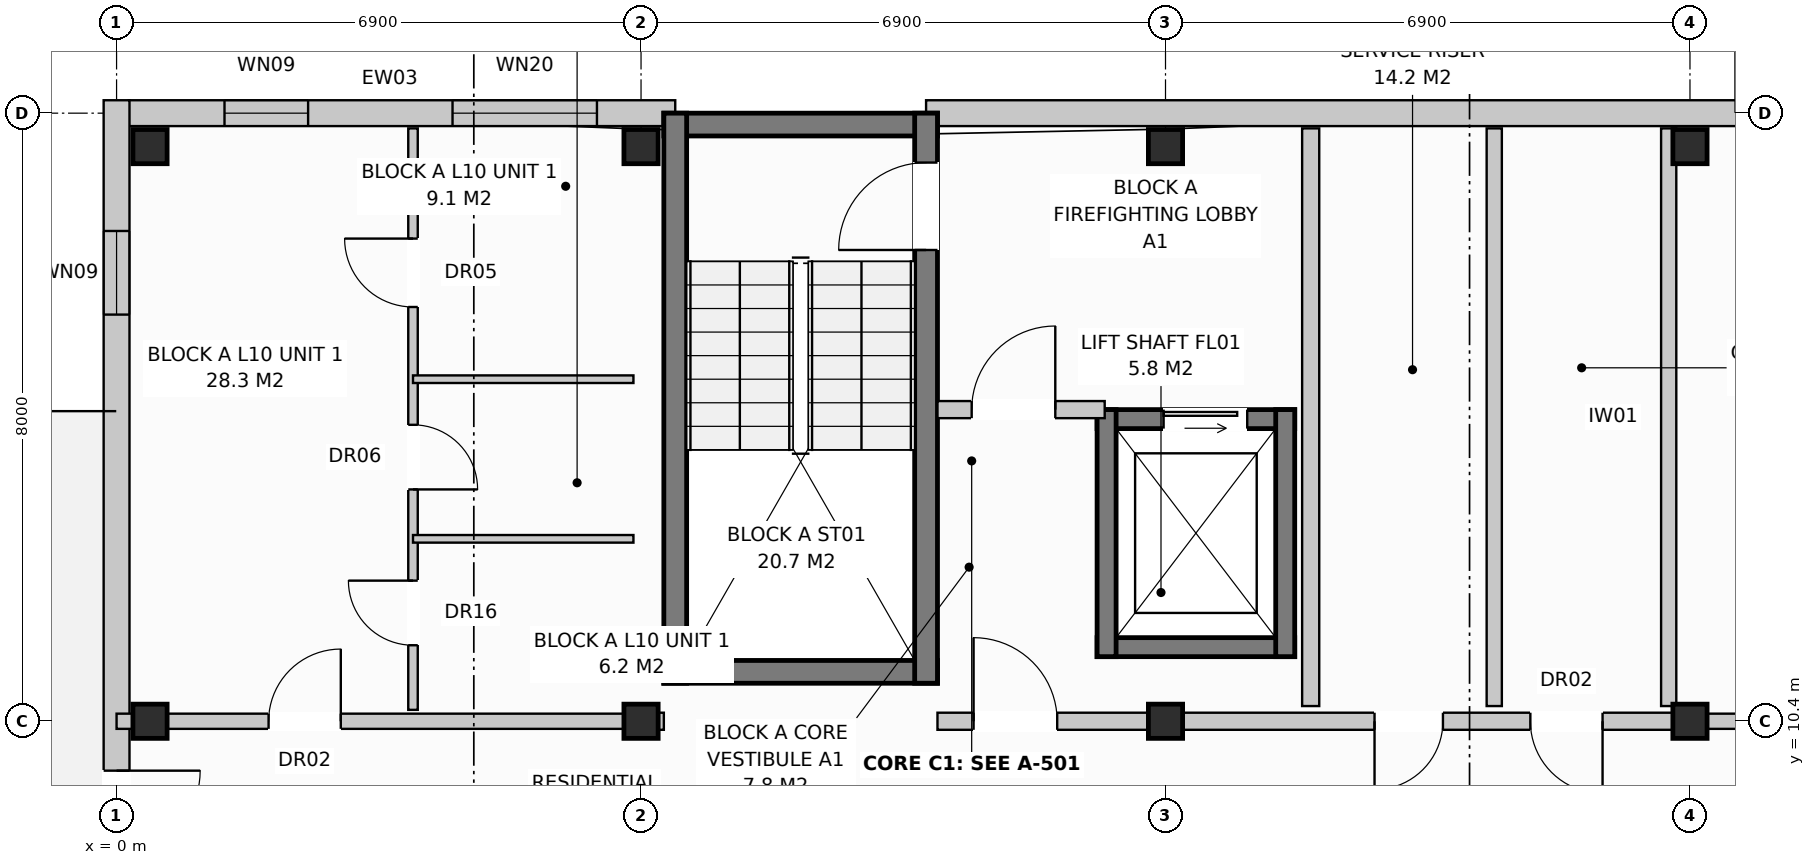
"""IFC4 building model, lengths in metres.
Left out: names, types, materials, properties, quantities, classifications, styles, units other than length and angle.
Written with IfcOpenShell. Run it as: python <this file> out.ifc"""

import sys

from ifc_helpers import new_model, si_unit, direction, frame, frame_2d, origin, origin_with_axes, origin_2d, place, context, subcontext, project, spatial, rectangle, extrude, element, fill, save


model = new_model("IFC4")
c1 = context("Model", 3, precision=1e-05, world=origin(), true_north=direction((0.0, 1.0)))
c2 = subcontext(c1, "Body", "Model", "MODEL_VIEW")
j1 = project(units=[si_unit("LENGTHUNIT", "METRE"), si_unit("PLANEANGLEUNIT", "RADIAN")], contexts=[c1])
p1 = place(None, origin())
s1 = spatial("IfcSite", under=j1, at=p1, CompositionType="ELEMENT")
p2 = place(p1, origin())
s2 = spatial("IfcBuilding", under=s1, at=p2, CompositionType="ELEMENT")
p3 = place(p2, frame((0.0, 0.0, 33.6)))
s3 = spatial("IfcBuildingStorey", under=s2, at=p3, CompositionType="ELEMENT", Elevation=33.6)
for number, where, z_axis, x_axis in (
    (1, (0.44, 10.4, 0.0), (0.0, 0.0, 1.0), (1.0, 0.0, 0.0)),
    (2, (0.44, 17.96, 0.0), (0.0, 0.0, 1.0), (1.0, 0.0, 0.0)),
    (3, (6.9, 10.4, 0.0), (0.0, 0.0, 1.0), (1.0, 0.0, 0.0)),
    (4, (6.9, 17.96, 0.0), (0.0, 0.0, 1.0), (1.0, 0.0, 0.0)),
    (5, (13.8, 10.4, 0.0), (0.0, 0.0, 1.0), (1.0, 0.0, 0.0)),
    (6, (13.8, 17.96, 0.0), (0.0, 0.0, 1.0), (1.0, 0.0, 0.0)),
    (7, (20.7, 10.4, 0.0), (0.0, 0.0, 1.0), (1.0, 0.0, 0.0)),
    (8, (20.7, 17.96, 0.0), (0.0, 0.0, 1.0), (1.0, 0.0, 0.0)),
):
    element("IfcColumn", number, at=place(p3, frame(where, z_axis=z_axis, x_axis=x_axis)), inside=s3, PredefinedType="COLUMN", context=c2, shape_type="SweptSolid", body=[
        extrude(rectangle(XDim=0.45, YDim=0.45, at=origin_2d()), origin(), (0.0, 0.0, 1.0), 3.2),
    ])
p4 = place(p3, frame((0.16, 18.4, 0.0), z_axis=(0.0, 0.0, 1.0), x_axis=(1.0, 0.0, 0.0)))
e9 = element("IfcWall", 9, at=p4, inside=s3, PredefinedType="STANDARD", context=c2, shape_type="SweptSolid", body=[
    extrude(rectangle(XDim=7.19, YDim=0.34, at=frame_2d((3.595, 0.0))), origin(), (0.0, 0.0, 1.0), 2.96),
])
p5 = place(p4, frame((1.26, 0.0, 0.72)))
e10 = element("IfcOpeningElement", 10, at=p5, cuts=e9, PredefinedType="OPENING", context=c2, shape_type="SweptSolid", body=[
    extrude(rectangle(XDim=1.1, YDim=1.5, at=frame_2d((0.55, 0.75))), frame((0.0, 0.182, 0.0), z_axis=(0.0, -1.0, 0.0), x_axis=(1.0, 0.0, 0.0)), (0.0, 0.0, 1.0), 0.364),
])
p6 = place(p4, frame((4.26, 0.0, 0.8)))
e11 = element("IfcOpeningElement", 11, at=p6, cuts=e9, PredefinedType="OPENING", context=c2, shape_type="SweptSolid", body=[
    extrude(rectangle(XDim=1.9, YDim=1.85, at=frame_2d((0.95, 0.925))), frame((0.0, 0.182, 0.0), z_axis=(0.0, -1.0, 0.0), x_axis=(1.0, 0.0, 0.0)), (0.0, 0.0, 1.0), 0.364),
])
p7 = place(p3, frame((10.65, 18.4, 0.0), z_axis=(0.0, 0.0, 1.0), x_axis=(1.0, 0.0, 0.0)))
e12 = element("IfcWall", 12, at=p7, inside=s3, PredefinedType="STANDARD", context=c2, shape_type="SweptSolid", body=[
    extrude(rectangle(XDim=17.4, YDim=0.34, at=frame_2d((8.7, 0.0))), origin(), (0.0, 0.0, 1.0), 2.96),
])
p8 = place(p7, frame((11.82, 0.0, 0.0)))
e13 = element("IfcOpeningElement", 13, at=p8, cuts=e12, PredefinedType="OPENING", context=c2, shape_type="SweptSolid", body=[
    extrude(rectangle(XDim=1.05, YDim=2.12, at=frame_2d((0.525, 1.06))), frame((0.0, 0.182, 0.0), z_axis=(0.0, -1.0, 0.0), x_axis=(1.0, 0.0, 0.0)), (0.0, 0.0, 1.0), 0.364),
])
p9 = place(p7, frame((14.87, 0.0, 0.72)))
e14 = element("IfcOpeningElement", 14, at=p9, cuts=e12, PredefinedType="OPENING", context=c2, shape_type="SweptSolid", body=[
    extrude(rectangle(XDim=1.1, YDim=1.5, at=frame_2d((0.55, 0.75))), frame((0.0, 0.182, 0.0), z_axis=(0.0, -1.0, 0.0), x_axis=(1.0, 0.0, 0.0)), (0.0, 0.0, 1.0), 0.364),
])
p10 = place(p3, frame((0.0, -0.17, 0.0), z_axis=(0.0, 0.0, 1.0), x_axis=(0.0, 1.0, 0.0)))
e15 = element("IfcWall", 15, at=p10, inside=s3, PredefinedType="STANDARD", context=c2, shape_type="SweptSolid", body=[
    extrude(rectangle(XDim=18.74, YDim=0.34, at=frame_2d((9.37, 0.0))), origin(), (0.0, 0.0, 1.0), 2.96),
])
p11 = place(p10, frame((8.82, 0.0, 0.0)))
e16 = element("IfcOpeningElement", 16, at=p11, cuts=e15, PredefinedType="OPENING", context=c2, shape_type="SweptSolid", body=[
    extrude(rectangle(XDim=1.1, YDim=2.1, at=frame_2d((0.55, 1.05))), frame((0.0, 0.182, 0.0), z_axis=(0.0, -1.0, 0.0), x_axis=(1.0, 0.0, 0.0)), (0.0, 0.0, 1.0), 0.364),
])
p12 = place(p10, frame((1.72, 0.0, 0.72)))
e17 = element("IfcOpeningElement", 17, at=p12, cuts=e15, PredefinedType="OPENING", context=c2, shape_type="SweptSolid", body=[
    extrude(rectangle(XDim=1.1, YDim=1.5, at=frame_2d((0.55, 0.75))), frame((0.0, 0.182, 0.0), z_axis=(0.0, -1.0, 0.0), x_axis=(1.0, 0.0, 0.0)), (0.0, 0.0, 1.0), 0.364),
])
p13 = place(p10, frame((15.92, 0.0, 0.72)))
e18 = element("IfcOpeningElement", 18, at=p13, cuts=e15, PredefinedType="OPENING", context=c2, shape_type="SweptSolid", body=[
    extrude(rectangle(XDim=1.1, YDim=1.5, at=frame_2d((0.55, 0.75))), frame((0.0, 0.182, 0.0), z_axis=(0.0, -1.0, 0.0), x_axis=(1.0, 0.0, 0.0)), (0.0, 0.0, 1.0), 0.364),
])
for number, where, z_axis, x_axis in (
    (19, (7.2, 18.25, 0.0), (0.0, 0.0, 1.0), (1.0, 0.0, 0.0)),
    (20, (7.2, 11.05, 0.0), (0.0, 0.0, 1.0), (1.0, 0.0, 0.0)),
):
    element("IfcWall", number, at=place(p3, frame(where, z_axis=z_axis, x_axis=x_axis)), inside=s3, PredefinedType="SHEAR", context=c2, shape_type="SweptSolid", body=[
        extrude(rectangle(XDim=3.6, YDim=0.3, at=frame_2d((1.8, 0.0))), origin(), (0.0, 0.0, 1.0), 2.96),
    ])
p14 = place(p3, frame((7.35, 10.9, 0.0), z_axis=(0.0, 0.0, 1.0), x_axis=(0.0, 1.0, 0.0)))
e21 = element("IfcWall", 21, at=p14, inside=s3, PredefinedType="SHEAR", context=c2, shape_type="SweptSolid", body=[
    extrude(rectangle(XDim=7.5, YDim=0.3, at=frame_2d((3.75, 0.0))), origin(), (0.0, 0.0, 1.0), 2.96),
])
p15 = place(p3, frame((10.65, 10.9, 0.0), z_axis=(0.0, 0.0, 1.0), x_axis=(0.0, 1.0, 0.0)))
e22 = element("IfcWall", 22, at=p15, inside=s3, PredefinedType="SHEAR", context=c2, shape_type="SweptSolid", body=[
    extrude(rectangle(XDim=7.5, YDim=0.3, at=frame_2d((3.75, 0.0))), origin(), (0.0, 0.0, 1.0), 2.96),
])
p16 = place(p15, frame((5.7, 0.0, 0.0)))
e23 = element("IfcOpeningElement", 23, at=p16, cuts=e22, PredefinedType="OPENING", context=c2, shape_type="SweptSolid", body=[
    extrude(rectangle(XDim=1.15, YDim=2.15, at=frame_2d((0.575, 1.075))), frame((0.0, 0.162, 0.0), z_axis=(0.0, -1.0, 0.0), x_axis=(1.0, 0.0, 0.0)), (0.0, 0.0, 1.0), 0.324),
])
p17 = place(p3, frame((12.9, 14.375, 0.0), z_axis=(0.0, 0.0, 1.0), x_axis=(1.0, 0.0, 0.0)))
e24 = element("IfcWall", 24, at=p17, inside=s3, PredefinedType="SHEAR", context=c2, shape_type="SweptSolid", body=[
    extrude(rectangle(XDim=2.6, YDim=0.25, at=frame_2d((1.3, 0.0))), origin(), (0.0, 0.0, 1.0), 2.96),
])
p18 = place(p17, frame((0.875, 0.0, 0.0)))
e25 = element("IfcOpeningElement", 25, at=p18, cuts=e24, PredefinedType="OPENING", context=c2, shape_type="SweptSolid", body=[
    extrude(rectangle(XDim=1.1, YDim=2.1, at=frame_2d((0.55, 1.05))), frame((0.0, 0.137, 0.0), z_axis=(0.0, -1.0, 0.0), x_axis=(1.0, 0.0, 0.0)), (0.0, 0.0, 1.0), 0.274),
])
p19 = place(p3, frame((12.9, 11.375, 0.0), z_axis=(0.0, 0.0, 1.0), x_axis=(1.0, 0.0, 0.0)))
e26 = element("IfcWall", 26, at=p19, inside=s3, PredefinedType="SHEAR", context=c2, shape_type="SweptSolid", body=[
    extrude(rectangle(XDim=2.6, YDim=0.25, at=frame_2d((1.3, 0.0))), origin(), (0.0, 0.0, 1.0), 2.96),
])
for number, where, z_axis, x_axis in (
    (27, (13.025, 11.25, 0.0), (0.0, 0.0, 1.0), (0.0, 1.0, 0.0)),
    (28, (15.375, 11.25, 0.0), (0.0, 0.0, 1.0), (0.0, 1.0, 0.0)),
):
    element("IfcWall", number, at=place(p3, frame(where, z_axis=z_axis, x_axis=x_axis)), inside=s3, PredefinedType="SHEAR", context=c2, shape_type="SweptSolid", body=[
        extrude(rectangle(XDim=3.25, YDim=0.25, at=frame_2d((1.625, 0.0))), origin(), (0.0, 0.0, 1.0), 2.96),
    ])
p20 = place(p3, frame((15.71, 10.6, 0.0), z_axis=(0.0, 0.0, 1.0), x_axis=(0.0, 1.0, 0.0)))
e29 = element("IfcWall", 29, at=p20, inside=s3, PredefinedType="PARTITIONING", context=c2, shape_type="SweptSolid", body=[
    extrude(rectangle(XDim=7.6, YDim=0.225, at=frame_2d((3.8, 0.0))), origin(), (0.0, 0.0, 1.0), 2.59),
])
p21 = place(p3, frame((10.8, 14.5, 0.0), z_axis=(0.0, 0.0, 1.0), x_axis=(1.0, 0.0, 0.0)))
e30 = element("IfcWall", 30, at=p21, inside=s3, PredefinedType="PARTITIONING", context=c2, shape_type="SweptSolid", body=[
    extrude(rectangle(XDim=2.2, YDim=0.225, at=frame_2d((1.1, 0.0))), origin(), (0.0, 0.0, 1.0), 2.96),
])
p22 = place(p21, frame((0.45, 0.0, 0.0)))
e31 = element("IfcOpeningElement", 31, at=p22, cuts=e30, PredefinedType="OPENING", context=c2, shape_type="SweptSolid", body=[
    extrude(rectangle(XDim=1.1, YDim=2.15, at=frame_2d((0.55, 1.075))), frame((0.0, 0.125, 0.0), z_axis=(0.0, -1.0, 0.0), x_axis=(1.0, 0.0, 0.0)), (0.0, 0.0, 1.0), 0.249),
])
p23 = place(p3, frame((6.9, 10.4, 0.0), z_axis=(0.0, 0.0, 1.0), x_axis=(1.0, 0.0, 0.0)))
e32 = element("IfcWall", 32, at=p23, inside=s3, PredefinedType="PARTITIONING", context=c2, shape_type="SweptSolid", body=[
    extrude(rectangle(XDim=0.3, YDim=0.225, at=frame_2d((0.15, 0.0))), origin(), (0.0, 0.0, 1.0), 2.96),
])
for number, where, z_axis, x_axis in (
    (33, (18.125, 10.6, 0.0), (0.0, 0.0, 1.0), (0.0, 1.0, 0.0)),
    (34, (20.42, 10.6, 0.0), (0.0, 0.0, 1.0), (0.0, 1.0, 0.0)),
):
    element("IfcWall", number, at=place(p3, frame(where, z_axis=z_axis, x_axis=x_axis)), inside=s3, PredefinedType="PARTITIONING", context=c2, shape_type="SweptSolid", body=[
        extrude(rectangle(XDim=7.6, YDim=0.2, at=frame_2d((3.8, 0.0))), origin(), (0.0, 0.0, 1.0), 2.96),
    ])
p24 = place(p3, frame((10.8, 10.4, 0.0), z_axis=(0.0, 0.0, 1.0), x_axis=(1.0, 0.0, 0.0)))
e35 = element("IfcWall", 35, at=p24, inside=s3, PredefinedType="PARTITIONING", context=c2, shape_type="SweptSolid", body=[
    extrude(rectangle(XDim=9.9, YDim=0.225, at=frame_2d((4.95, 0.0))), origin(), (0.0, 0.0, 1.0), 2.4),
])
p25 = place(p24, frame((0.475, 0.0, 0.0)))
e36 = element("IfcOpeningElement", 36, at=p25, cuts=e35, PredefinedType="OPENING", context=c2, shape_type="SweptSolid", body=[
    extrude(rectangle(XDim=1.1, YDim=2.15, at=frame_2d((0.55, 1.075))), frame((0.0, 0.125, 0.0), z_axis=(0.0, -1.0, 0.0), x_axis=(1.0, 0.0, 0.0)), (0.0, 0.0, 1.0), 0.249),
])
p26 = place(p24, frame((5.75, 0.0, 0.0)))
e37 = element("IfcOpeningElement", 37, at=p26, cuts=e35, PredefinedType="OPENING", context=c2, shape_type="SweptSolid", body=[
    extrude(rectangle(XDim=0.9, YDim=2.1, at=frame_2d((0.45, 1.05))), frame((0.0, 0.125, 0.0), z_axis=(0.0, -1.0, 0.0), x_axis=(1.0, 0.0, 0.0)), (0.0, 0.0, 1.0), 0.249),
])
p27 = place(p24, frame((7.8, 0.0, 0.0)))
e38 = element("IfcOpeningElement", 38, at=p27, cuts=e35, PredefinedType="OPENING", context=c2, shape_type="SweptSolid", body=[
    extrude(rectangle(XDim=0.95, YDim=2.15, at=frame_2d((0.475, 1.075))), frame((0.0, 0.125, 0.0), z_axis=(0.0, -1.0, 0.0), x_axis=(1.0, 0.0, 0.0)), (0.0, 0.0, 1.0), 0.249),
])
p28 = place(p3, frame((0.0, 10.4, 0.0), z_axis=(0.0, 0.0, 1.0), x_axis=(1.0, 0.0, 0.0)))
e39 = element("IfcWall", 39, at=p28, inside=s3, PredefinedType="PARTITIONING", context=c2, shape_type="SweptSolid", body=[
    extrude(rectangle(XDim=6.9, YDim=0.2, at=frame_2d((3.45, 0.0))), origin(), (0.0, 0.0, 1.0), 2.4),
])
p29 = place(p28, frame((2.0, 0.0, 0.0)))
e40 = element("IfcOpeningElement", 40, at=p29, cuts=e39, PredefinedType="OPENING", context=c2, shape_type="SweptSolid", body=[
    extrude(rectangle(XDim=0.95, YDim=2.15, at=frame_2d((0.475, 1.075))), frame((0.0, 0.112, 0.0), z_axis=(0.0, -1.0, 0.0), x_axis=(1.0, 0.0, 0.0)), (0.0, 0.0, 1.0), 0.224),
])
p30 = place(p3, frame((3.9, 10.55, 0.0), z_axis=(0.0, 0.0, 1.0), x_axis=(0.0, 1.0, 0.0)))
e41 = element("IfcWall", 41, at=p30, inside=s3, PredefinedType="PARTITIONING", context=c2, shape_type="SweptSolid", body=[
    extrude(rectangle(XDim=7.65, YDim=0.125, at=frame_2d((3.825, 0.0))), origin(), (0.0, 0.0, 1.0), 2.96),
])
p31 = place(p30, frame((0.85, 0.0, 0.0)))
e42 = element("IfcOpeningElement", 42, at=p31, cuts=e41, PredefinedType="OPENING", context=c2, shape_type="SweptSolid", body=[
    extrude(rectangle(XDim=0.85, YDim=2.1, at=frame_2d((0.425, 1.05))), frame((0.0, 0.074, 0.0), z_axis=(0.0, -1.0, 0.0), x_axis=(1.0, 0.0, 0.0)), (0.0, 0.0, 1.0), 0.149),
])
p32 = place(p30, frame((2.9, 0.0, 0.0)))
e43 = element("IfcOpeningElement", 43, at=p32, cuts=e41, PredefinedType="OPENING", context=c2, shape_type="SweptSolid", body=[
    extrude(rectangle(XDim=0.85, YDim=2.05, at=frame_2d((0.425, 1.025))), frame((0.0, 0.074, 0.0), z_axis=(0.0, -1.0, 0.0), x_axis=(1.0, 0.0, 0.0)), (0.0, 0.0, 1.0), 0.149),
])
p33 = place(p30, frame((5.3, 0.0, 0.0)))
e44 = element("IfcOpeningElement", 44, at=p33, cuts=e41, PredefinedType="OPENING", context=c2, shape_type="SweptSolid", body=[
    extrude(rectangle(XDim=0.9, YDim=2.1, at=frame_2d((0.45, 1.05))), frame((0.0, 0.074, 0.0), z_axis=(0.0, -1.0, 0.0), x_axis=(1.0, 0.0, 0.0)), (0.0, 0.0, 1.0), 0.149),
])
for number, where, z_axis, x_axis in (
    (45, (3.9, 12.8, 0.0), (0.0, 0.0, 1.0), (1.0, 0.0, 0.0)),
    (46, (3.9, 14.9, 0.0), (0.0, 0.0, 1.0), (1.0, 0.0, 0.0)),
):
    element("IfcWall", number, at=place(p3, frame(where, z_axis=z_axis, x_axis=x_axis)), inside=s3, PredefinedType="PARTITIONING", context=c2, shape_type="SweptSolid", body=[
        extrude(rectangle(XDim=2.9, YDim=0.1, at=frame_2d((1.45, 0.0))), origin(), (0.0, 0.0, 1.0), 2.96),
    ])
p34 = place(p3, frame((20.7, 10.4, 0.0), z_axis=(0.0, 0.0, 1.0), x_axis=(1.0, 0.0, 0.0)))
e47 = element("IfcWall", 47, at=p34, inside=s3, PredefinedType="PARTITIONING", context=c2, shape_type="SweptSolid", body=[
    extrude(rectangle(XDim=6.9, YDim=0.2, at=frame_2d((3.45, 0.0))), origin(), (0.0, 0.0, 1.0), 2.4),
])
p35 = place(p34, frame((2.0, 0.0, 0.0)))
e48 = element("IfcOpeningElement", 48, at=p35, cuts=e47, PredefinedType="OPENING", context=c2, shape_type="SweptSolid", body=[
    extrude(rectangle(XDim=0.95, YDim=2.15, at=frame_2d((0.475, 1.075))), frame((0.0, 0.112, 0.0), z_axis=(0.0, -1.0, 0.0), x_axis=(1.0, 0.0, 0.0)), (0.0, 0.0, 1.0), 0.224),
])
p36 = place(p5, origin_with_axes())
e49 = element("IfcWindow", 49, at=p36, inside=s3, PartitioningType="SINGLE_PANEL", PredefinedType="WINDOW", context=c2, shape_type="SweptSolid", body=[
    extrude(rectangle(XDim=1.1, YDim=1.5, at=frame_2d((0.55, 0.75))), frame((0.0, 0.03, 0.0), z_axis=(0.0, -1.0, 0.0), x_axis=(1.0, 0.0, 0.0)), (0.0, 0.0, 1.0), 0.06),
])
fill(e10, e49)
p37 = place(p6, origin_with_axes())
e50 = element("IfcWindow", 50, at=p37, inside=s3, PartitioningType="SINGLE_PANEL", PredefinedType="WINDOW", context=c2, shape_type="SweptSolid", body=[
    extrude(rectangle(XDim=1.9, YDim=1.85, at=frame_2d((0.95, 0.925))), frame((0.0, 0.03, 0.0), z_axis=(0.0, -1.0, 0.0), x_axis=(1.0, 0.0, 0.0)), (0.0, 0.0, 1.0), 0.06),
])
fill(e11, e50)
p38 = place(p11, frame((1.1, 0.0, 0.0), z_axis=(0.0, 0.0, 1.0), x_axis=(-1.0, 0.0, 0.0)))
e51 = element("IfcDoor", 51, at=p38, inside=s3, OperationType="SINGLE_SWING_RIGHT", PredefinedType="DOOR", context=c2, shape_type="SweptSolid", body=[
    extrude(rectangle(XDim=1.1, YDim=2.1, at=frame_2d((0.55, 1.05))), frame((0.0, 0.025, 0.0), z_axis=(0.0, -1.0, 0.0), x_axis=(1.0, 0.0, 0.0)), (0.0, 0.0, 1.0), 0.05),
])
fill(e16, e51)
p39 = place(p13, origin_with_axes())
e52 = element("IfcWindow", 52, at=p39, inside=s3, PartitioningType="SINGLE_PANEL", PredefinedType="WINDOW", context=c2, shape_type="SweptSolid", body=[
    extrude(rectangle(XDim=1.1, YDim=1.5, at=frame_2d((0.55, 0.75))), frame((0.0, 0.03, 0.0), z_axis=(0.0, -1.0, 0.0), x_axis=(1.0, 0.0, 0.0)), (0.0, 0.0, 1.0), 0.06),
])
fill(e18, e52)
p40 = place(p16, origin_with_axes())
e53 = element("IfcDoor", 53, at=p40, inside=s3, OperationType="SINGLE_SWING_LEFT", PredefinedType="DOOR", context=c2, shape_type="SweptSolid", body=[
    extrude(rectangle(XDim=1.15, YDim=2.15, at=frame_2d((0.575, 1.075))), frame((0.0, 0.025, 0.0), z_axis=(0.0, -1.0, 0.0), x_axis=(1.0, 0.0, 0.0)), (0.0, 0.0, 1.0), 0.05),
])
fill(e23, e53)
p41 = place(p18, origin_with_axes())
e54 = element("IfcDoor", 54, at=p41, inside=s3, OperationType="SLIDING_TO_LEFT", PredefinedType="DOOR", context=c2, shape_type="SweptSolid", body=[
    extrude(rectangle(XDim=1.1, YDim=2.1, at=frame_2d((0.55, 1.05))), frame((0.0, 0.025, 0.0), z_axis=(0.0, -1.0, 0.0), x_axis=(1.0, 0.0, 0.0)), (0.0, 0.0, 1.0), 0.05),
])
fill(e25, e54)
p42 = place(p22, origin_with_axes())
e55 = element("IfcDoor", 55, at=p42, inside=s3, OperationType="SINGLE_SWING_RIGHT", PredefinedType="DOOR", context=c2, shape_type="SweptSolid", body=[
    extrude(rectangle(XDim=1.1, YDim=2.15, at=frame_2d((0.55, 1.075))), frame((0.0, 0.025, 0.0), z_axis=(0.0, -1.0, 0.0), x_axis=(1.0, 0.0, 0.0)), (0.0, 0.0, 1.0), 0.05),
])
fill(e31, e55)
p43 = place(p25, origin_with_axes())
e56 = element("IfcDoor", 56, at=p43, inside=s3, OperationType="SINGLE_SWING_LEFT", PredefinedType="DOOR", context=c2, shape_type="SweptSolid", body=[
    extrude(rectangle(XDim=1.1, YDim=2.15, at=frame_2d((0.55, 1.075))), frame((0.0, 0.025, 0.0), z_axis=(0.0, -1.0, 0.0), x_axis=(1.0, 0.0, 0.0)), (0.0, 0.0, 1.0), 0.05),
])
fill(e36, e56)
p44 = place(p26, frame((0.9, 0.0, 0.0), z_axis=(0.0, 0.0, 1.0), x_axis=(-1.0, 0.0, 0.0)))
e57 = element("IfcDoor", 57, at=p44, inside=s3, OperationType="SINGLE_SWING_LEFT", PredefinedType="DOOR", context=c2, shape_type="SweptSolid", body=[
    extrude(rectangle(XDim=0.9, YDim=2.1, at=frame_2d((0.45, 1.05))), frame((0.0, 0.025, 0.0), z_axis=(0.0, -1.0, 0.0), x_axis=(1.0, 0.0, 0.0)), (0.0, 0.0, 1.0), 0.05),
])
fill(e37, e57)
p45 = place(p27, frame((0.95, 0.0, 0.0), z_axis=(0.0, 0.0, 1.0), x_axis=(-1.0, 0.0, 0.0)))
e58 = element("IfcDoor", 58, at=p45, inside=s3, OperationType="SINGLE_SWING_RIGHT", PredefinedType="DOOR", context=c2, shape_type="SweptSolid", body=[
    extrude(rectangle(XDim=0.95, YDim=2.15, at=frame_2d((0.475, 1.075))), frame((0.0, 0.025, 0.0), z_axis=(0.0, -1.0, 0.0), x_axis=(1.0, 0.0, 0.0)), (0.0, 0.0, 1.0), 0.05),
])
fill(e38, e58)
p46 = place(p29, origin_with_axes())
e59 = element("IfcDoor", 59, at=p46, inside=s3, OperationType="SINGLE_SWING_RIGHT", PredefinedType="DOOR", context=c2, shape_type="SweptSolid", body=[
    extrude(rectangle(XDim=0.95, YDim=2.15, at=frame_2d((0.475, 1.075))), frame((0.0, 0.025, 0.0), z_axis=(0.0, -1.0, 0.0), x_axis=(1.0, 0.0, 0.0)), (0.0, 0.0, 1.0), 0.05),
])
fill(e40, e59)
p47 = place(p31, origin_with_axes())
e60 = element("IfcDoor", 60, at=p47, inside=s3, OperationType="SINGLE_SWING_RIGHT", PredefinedType="DOOR", context=c2, shape_type="SweptSolid", body=[
    extrude(rectangle(XDim=0.85, YDim=2.1, at=frame_2d((0.425, 1.05))), frame((0.0, 0.025, 0.0), z_axis=(0.0, -1.0, 0.0), x_axis=(1.0, 0.0, 0.0)), (0.0, 0.0, 1.0), 0.05),
])
fill(e42, e60)
p48 = place(p32, frame((0.85, 0.0, 0.0), z_axis=(0.0, 0.0, 1.0), x_axis=(-1.0, 0.0, 0.0)))
e61 = element("IfcDoor", 61, at=p48, inside=s3, OperationType="SINGLE_SWING_LEFT", PredefinedType="DOOR", context=c2, shape_type="SweptSolid", body=[
    extrude(rectangle(XDim=0.85, YDim=2.05, at=frame_2d((0.425, 1.025))), frame((0.0, 0.025, 0.0), z_axis=(0.0, -1.0, 0.0), x_axis=(1.0, 0.0, 0.0)), (0.0, 0.0, 1.0), 0.05),
])
fill(e43, e61)
p49 = place(p33, origin_with_axes())
e62 = element("IfcDoor", 62, at=p49, inside=s3, OperationType="SINGLE_SWING_RIGHT", PredefinedType="DOOR", context=c2, shape_type="SweptSolid", body=[
    extrude(rectangle(XDim=0.9, YDim=2.1, at=frame_2d((0.45, 1.05))), frame((0.0, 0.025, 0.0), z_axis=(0.0, -1.0, 0.0), x_axis=(1.0, 0.0, 0.0)), (0.0, 0.0, 1.0), 0.05),
])
fill(e44, e62)
save(model, sys.argv[1])
